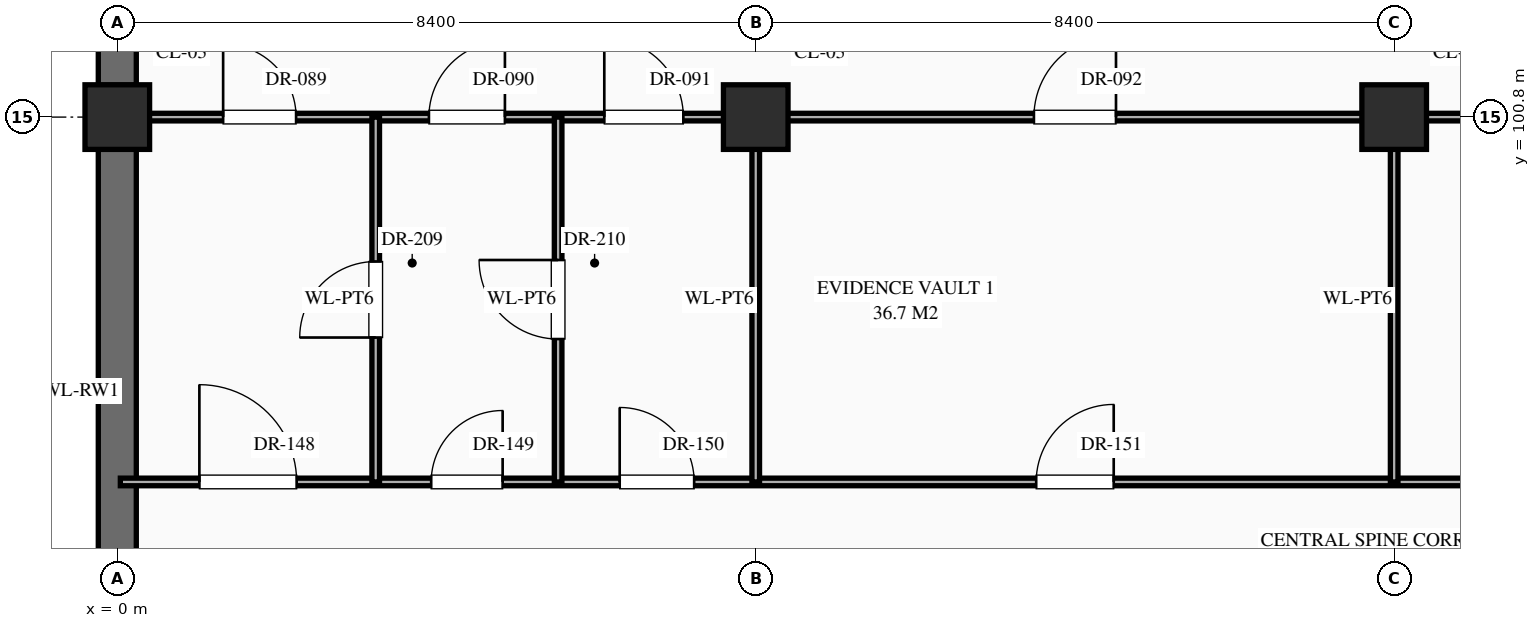
"""IFC4 building model, lengths in metres.
Left out: names, types, materials, properties, quantities, classifications, styles, units other than length and angle.
Written with IfcOpenShell. Run it as: python <this file> out.ifc"""

import sys

from ifc_helpers import new_model, si_unit, direction, frame, frame_2d, origin, origin_2d, place, context, subcontext, project, spatial, rectangle, extrude, element, fill, save


model = new_model("IFC4")
c1 = context("Model", 3, precision=1e-05, world=origin(), true_north=direction((0.0, 1.0)))
c2 = subcontext(c1, "Body", "Model", "MODEL_VIEW")
j1 = project(units=[si_unit("LENGTHUNIT", "METRE"), si_unit("PLANEANGLEUNIT", "RADIAN")], contexts=[c1])
p1 = place(None, origin())
s1 = spatial("IfcSite", under=j1, at=p1, CompositionType="ELEMENT")
p2 = place(p1, origin())
s2 = spatial("IfcBuilding", under=s1, at=p2, CompositionType="ELEMENT")
p3 = place(p2, frame((0.0, 0.0, -10.2)))
s3 = spatial("IfcBuildingStorey", under=s2, at=p3, CompositionType="ELEMENT", Elevation=-10.2)
for number, where, z_axis, x_axis in (
    (1, (0.0, 100.8, 0.0), (0.0, 0.0, 1.0), (1.0, 0.0, 0.0)),
    (2, (8.4, 100.8, 0.0), (0.0, 0.0, 1.0), (1.0, 0.0, 0.0)),
    (3, (16.8, 100.8, 0.0), (0.0, 0.0, 1.0), (1.0, 0.0, 0.0)),
):
    element("IfcColumn", number, at=place(p3, frame(where, z_axis=z_axis, x_axis=x_axis)), inside=s3, PredefinedType="COLUMN", context=c2, shape_type="SweptSolid", body=[
        extrude(rectangle(XDim=0.85, YDim=0.85, at=origin_2d()), origin(), (0.0, 0.0, 1.0), 4.8),
    ])
p4 = place(p3, frame((0.0, 94.02, 0.0), z_axis=(0.0, 0.0, 1.0), x_axis=(0.0, 1.0, 0.0)))
e4 = element("IfcWall", 4, at=p4, inside=s3, PredefinedType="USERDEFINED", context=c2, shape_type="SweptSolid", body=[
    extrude(rectangle(XDim=6.36, YDim=0.5, at=frame_2d((3.18, 0.0))), origin(), (0.0, 0.0, 1.0), 4.48),
])
p5 = place(p3, frame((0.0, 101.22, 0.0), z_axis=(0.0, 0.0, 1.0), x_axis=(0.0, 1.0, 0.0)))
e5 = element("IfcWall", 5, at=p5, inside=s3, PredefinedType="USERDEFINED", context=c2, shape_type="SweptSolid", body=[
    extrude(rectangle(XDim=6.36, YDim=0.5, at=frame_2d((3.18, 0.0))), origin(), (0.0, 0.0, 1.0), 4.48),
])
p6 = place(p3, frame((0.04, 96.0, 0.0), z_axis=(0.0, 0.0, 1.0), x_axis=(1.0, 0.0, 0.0)))
e6 = element("IfcWall", 6, at=p6, inside=s3, PredefinedType="STANDARD", context=c2, shape_type="SweptSolid", body=[
    extrude(rectangle(XDim=151.16, YDim=0.1, at=frame_2d((75.58, 0.0))), origin(), (0.0, 0.0, 1.0), 4.48),
])
p7 = place(p6, frame((1.04, 0.0, 0.0)))
e7 = element("IfcOpeningElement", 7, at=p7, cuts=e6, PredefinedType="OPENING", context=c2, shape_type="SweptSolid", body=[
    extrude(rectangle(XDim=1.28, YDim=2.35, at=frame_2d((0.64, 1.175))), frame((0.0, 0.062, 0.0), z_axis=(0.0, -1.0, 0.0), x_axis=(1.0, 0.0, 0.0)), (0.0, 0.0, 1.0), 0.124),
])
p8 = place(p6, frame((4.09, 0.0, 0.0)))
e8 = element("IfcOpeningElement", 8, at=p8, cuts=e6, PredefinedType="OPENING", context=c2, shape_type="SweptSolid", body=[
    extrude(rectangle(XDim=0.94, YDim=2.3, at=frame_2d((0.47, 1.15))), frame((0.0, 0.062, 0.0), z_axis=(0.0, -1.0, 0.0), x_axis=(1.0, 0.0, 0.0)), (0.0, 0.0, 1.0), 0.124),
])
p9 = place(p6, frame((6.57, 0.0, 0.0)))
e9 = element("IfcOpeningElement", 9, at=p9, cuts=e6, PredefinedType="OPENING", context=c2, shape_type="SweptSolid", body=[
    extrude(rectangle(XDim=0.98, YDim=2.35, at=frame_2d((0.49, 1.175))), frame((0.0, 0.062, 0.0), z_axis=(0.0, -1.0, 0.0), x_axis=(1.0, 0.0, 0.0)), (0.0, 0.0, 1.0), 0.124),
])
p10 = place(p6, frame((12.05, 0.0, 0.0)))
e10 = element("IfcOpeningElement", 10, at=p10, cuts=e6, PredefinedType="OPENING", context=c2, shape_type="SweptSolid", body=[
    extrude(rectangle(XDim=1.02, YDim=2.4, at=frame_2d((0.51, 1.2))), frame((0.0, 0.062, 0.0), z_axis=(0.0, -1.0, 0.0), x_axis=(1.0, 0.0, 0.0)), (0.0, 0.0, 1.0), 0.124),
])
p11 = place(p6, frame((20.43, 0.0, 0.0)))
e11 = element("IfcOpeningElement", 11, at=p11, cuts=e6, PredefinedType="OPENING", context=c2, shape_type="SweptSolid", body=[
    extrude(rectangle(XDim=1.06, YDim=2.4, at=frame_2d((0.53, 1.2))), frame((0.0, 0.062, 0.0), z_axis=(0.0, -1.0, 0.0), x_axis=(1.0, 0.0, 0.0)), (0.0, 0.0, 1.0), 0.124),
])
p12 = place(p6, frame((26.29, 0.0, 0.0)))
e12 = element("IfcOpeningElement", 12, at=p12, cuts=e6, PredefinedType="OPENING", context=c2, shape_type="SweptSolid", body=[
    extrude(rectangle(XDim=1.14, YDim=2.4, at=frame_2d((0.57, 1.2))), frame((0.0, 0.062, 0.0), z_axis=(0.0, -1.0, 0.0), x_axis=(1.0, 0.0, 0.0)), (0.0, 0.0, 1.0), 0.124),
])
p13 = place(p6, frame((29.31, 0.0, 0.0)))
e13 = element("IfcOpeningElement", 13, at=p13, cuts=e6, PredefinedType="OPENING", context=c2, shape_type="SweptSolid", body=[
    extrude(rectangle(XDim=0.9, YDim=2.15, at=frame_2d((0.45, 1.075))), frame((0.0, 0.062, 0.0), z_axis=(0.0, -1.0, 0.0), x_axis=(1.0, 0.0, 0.0)), (0.0, 0.0, 1.0), 0.124),
])
p14 = place(p6, frame((31.83, 0.0, 0.0)))
e14 = element("IfcOpeningElement", 14, at=p14, cuts=e6, PredefinedType="OPENING", context=c2, shape_type="SweptSolid", body=[
    extrude(rectangle(XDim=0.86, YDim=2.1, at=frame_2d((0.43, 1.05))), frame((0.0, 0.062, 0.0), z_axis=(0.0, -1.0, 0.0), x_axis=(1.0, 0.0, 0.0)), (0.0, 0.0, 1.0), 0.124),
])
p15 = place(p6, frame((37.3, 0.0, 0.0)))
e15 = element("IfcOpeningElement", 15, at=p15, cuts=e6, PredefinedType="OPENING", context=c2, shape_type="SweptSolid", body=[
    extrude(rectangle(XDim=0.92, YDim=2.15, at=frame_2d((0.46, 1.075))), frame((0.0, 0.062, 0.0), z_axis=(0.0, -1.0, 0.0), x_axis=(1.0, 0.0, 0.0)), (0.0, 0.0, 1.0), 0.124),
])
p16 = place(p6, frame((45.68, 0.0, 0.0)))
e16 = element("IfcOpeningElement", 16, at=p16, cuts=e6, PredefinedType="OPENING", context=c2, shape_type="SweptSolid", body=[
    extrude(rectangle(XDim=0.96, YDim=2.2, at=frame_2d((0.48, 1.1))), frame((0.0, 0.062, 0.0), z_axis=(0.0, -1.0, 0.0), x_axis=(1.0, 0.0, 0.0)), (0.0, 0.0, 1.0), 0.124),
])
p17 = place(p6, frame((51.57, 0.0, 0.0)))
e17 = element("IfcOpeningElement", 17, at=p17, cuts=e6, PredefinedType="OPENING", context=c2, shape_type="SweptSolid", body=[
    extrude(rectangle(XDim=0.98, YDim=2.35, at=frame_2d((0.49, 1.175))), frame((0.0, 0.062, 0.0), z_axis=(0.0, -1.0, 0.0), x_axis=(1.0, 0.0, 0.0)), (0.0, 0.0, 1.0), 0.124),
])
p18 = place(p6, frame((54.45, 0.0, 0.0)))
e18 = element("IfcOpeningElement", 18, at=p18, cuts=e6, PredefinedType="OPENING", context=c2, shape_type="SweptSolid", body=[
    extrude(rectangle(XDim=1.02, YDim=2.4, at=frame_2d((0.51, 1.2))), frame((0.0, 0.062, 0.0), z_axis=(0.0, -1.0, 0.0), x_axis=(1.0, 0.0, 0.0)), (0.0, 0.0, 1.0), 0.124),
])
p19 = place(p6, frame((56.93, 0.0, 0.0)))
e19 = element("IfcOpeningElement", 19, at=p19, cuts=e6, PredefinedType="OPENING", context=c2, shape_type="SweptSolid", body=[
    extrude(rectangle(XDim=1.06, YDim=2.4, at=frame_2d((0.53, 1.2))), frame((0.0, 0.062, 0.0), z_axis=(0.0, -1.0, 0.0), x_axis=(1.0, 0.0, 0.0)), (0.0, 0.0, 1.0), 0.124),
])
p20 = place(p6, frame((62.39, 0.0, 0.0)))
e20 = element("IfcOpeningElement", 20, at=p20, cuts=e6, PredefinedType="OPENING", context=c2, shape_type="SweptSolid", body=[
    extrude(rectangle(XDim=1.14, YDim=2.4, at=frame_2d((0.57, 1.2))), frame((0.0, 0.062, 0.0), z_axis=(0.0, -1.0, 0.0), x_axis=(1.0, 0.0, 0.0)), (0.0, 0.0, 1.0), 0.124),
])
p21 = place(p6, frame((70.91, 0.0, 0.0)))
e21 = element("IfcOpeningElement", 21, at=p21, cuts=e6, PredefinedType="OPENING", context=c2, shape_type="SweptSolid", body=[
    extrude(rectangle(XDim=0.9, YDim=2.15, at=frame_2d((0.45, 1.075))), frame((0.0, 0.062, 0.0), z_axis=(0.0, -1.0, 0.0), x_axis=(1.0, 0.0, 0.0)), (0.0, 0.0, 1.0), 0.124),
])
p22 = place(p6, frame((79.33, 0.0, 0.0)))
e22 = element("IfcOpeningElement", 22, at=p22, cuts=e6, PredefinedType="OPENING", context=c2, shape_type="SweptSolid", body=[
    extrude(rectangle(XDim=0.86, YDim=2.1, at=frame_2d((0.43, 1.05))), frame((0.0, 0.062, 0.0), z_axis=(0.0, -1.0, 0.0), x_axis=(1.0, 0.0, 0.0)), (0.0, 0.0, 1.0), 0.124),
])
p23 = place(p6, frame((85.1, 0.0, 0.0)))
e23 = element("IfcOpeningElement", 23, at=p23, cuts=e6, PredefinedType="OPENING", context=c2, shape_type="SweptSolid", body=[
    extrude(rectangle(XDim=1.12, YDim=2.25, at=frame_2d((0.56, 1.125))), frame((0.0, 0.062, 0.0), z_axis=(0.0, -1.0, 0.0), x_axis=(1.0, 0.0, 0.0)), (0.0, 0.0, 1.0), 0.124),
])
p24 = place(p6, frame((87.98, 0.0, 0.0)))
e24 = element("IfcOpeningElement", 24, at=p24, cuts=e6, PredefinedType="OPENING", context=c2, shape_type="SweptSolid", body=[
    extrude(rectangle(XDim=1.16, YDim=2.3, at=frame_2d((0.58, 1.15))), frame((0.0, 0.062, 0.0), z_axis=(0.0, -1.0, 0.0), x_axis=(1.0, 0.0, 0.0)), (0.0, 0.0, 1.0), 0.124),
])
p25 = place(p6, frame((90.46, 0.0, 0.0)))
e25 = element("IfcOpeningElement", 25, at=p25, cuts=e6, PredefinedType="OPENING", context=c2, shape_type="SweptSolid", body=[
    extrude(rectangle(XDim=1.2, YDim=2.35, at=frame_2d((0.6, 1.175))), frame((0.0, 0.062, 0.0), z_axis=(0.0, -1.0, 0.0), x_axis=(1.0, 0.0, 0.0)), (0.0, 0.0, 1.0), 0.124),
])
p26 = place(p6, frame((95.94, 0.0, 0.0)))
e26 = element("IfcOpeningElement", 26, at=p26, cuts=e6, PredefinedType="OPENING", context=c2, shape_type="SweptSolid", body=[
    extrude(rectangle(XDim=1.24, YDim=2.3, at=frame_2d((0.62, 1.15))), frame((0.0, 0.062, 0.0), z_axis=(0.0, -1.0, 0.0), x_axis=(1.0, 0.0, 0.0)), (0.0, 0.0, 1.0), 0.124),
])
p27 = place(p6, frame((104.32, 0.0, 0.0)))
e27 = element("IfcOpeningElement", 27, at=p27, cuts=e6, PredefinedType="OPENING", context=c2, shape_type="SweptSolid", body=[
    extrude(rectangle(XDim=1.28, YDim=2.35, at=frame_2d((0.64, 1.175))), frame((0.0, 0.062, 0.0), z_axis=(0.0, -1.0, 0.0), x_axis=(1.0, 0.0, 0.0)), (0.0, 0.0, 1.0), 0.124),
])
p28 = place(p6, frame((110.39, 0.0, 0.0)))
e28 = element("IfcOpeningElement", 28, at=p28, cuts=e6, PredefinedType="OPENING", context=c2, shape_type="SweptSolid", body=[
    extrude(rectangle(XDim=0.94, YDim=2.3, at=frame_2d((0.47, 1.15))), frame((0.0, 0.062, 0.0), z_axis=(0.0, -1.0, 0.0), x_axis=(1.0, 0.0, 0.0)), (0.0, 0.0, 1.0), 0.124),
])
p29 = place(p6, frame((113.27, 0.0, 0.0)))
e29 = element("IfcOpeningElement", 29, at=p29, cuts=e6, PredefinedType="OPENING", context=c2, shape_type="SweptSolid", body=[
    extrude(rectangle(XDim=0.98, YDim=2.35, at=frame_2d((0.49, 1.175))), frame((0.0, 0.062, 0.0), z_axis=(0.0, -1.0, 0.0), x_axis=(1.0, 0.0, 0.0)), (0.0, 0.0, 1.0), 0.124),
])
p30 = place(p6, frame((115.75, 0.0, 0.0)))
e30 = element("IfcOpeningElement", 30, at=p30, cuts=e6, PredefinedType="OPENING", context=c2, shape_type="SweptSolid", body=[
    extrude(rectangle(XDim=1.02, YDim=2.4, at=frame_2d((0.51, 1.2))), frame((0.0, 0.062, 0.0), z_axis=(0.0, -1.0, 0.0), x_axis=(1.0, 0.0, 0.0)), (0.0, 0.0, 1.0), 0.124),
])
p31 = place(p6, frame((121.24, 0.0, 0.0)))
e31 = element("IfcOpeningElement", 31, at=p31, cuts=e6, PredefinedType="OPENING", context=c2, shape_type="SweptSolid", body=[
    extrude(rectangle(XDim=1.04, YDim=2.2, at=frame_2d((0.52, 1.1))), frame((0.0, 0.062, 0.0), z_axis=(0.0, -1.0, 0.0), x_axis=(1.0, 0.0, 0.0)), (0.0, 0.0, 1.0), 0.124),
])
p32 = place(p6, frame((129.62, 0.0, 0.0)))
e32 = element("IfcOpeningElement", 32, at=p32, cuts=e6, PredefinedType="OPENING", context=c2, shape_type="SweptSolid", body=[
    extrude(rectangle(XDim=1.08, YDim=2.25, at=frame_2d((0.54, 1.125))), frame((0.0, 0.062, 0.0), z_axis=(0.0, -1.0, 0.0), x_axis=(1.0, 0.0, 0.0)), (0.0, 0.0, 1.0), 0.124),
])
p33 = place(p6, frame((135.5, 0.0, 0.0)))
e33 = element("IfcOpeningElement", 33, at=p33, cuts=e6, PredefinedType="OPENING", context=c2, shape_type="SweptSolid", body=[
    extrude(rectangle(XDim=1.12, YDim=2.25, at=frame_2d((0.56, 1.125))), frame((0.0, 0.062, 0.0), z_axis=(0.0, -1.0, 0.0), x_axis=(1.0, 0.0, 0.0)), (0.0, 0.0, 1.0), 0.124),
])
p34 = place(p6, frame((138.38, 0.0, 0.0)))
e34 = element("IfcOpeningElement", 34, at=p34, cuts=e6, PredefinedType="OPENING", context=c2, shape_type="SweptSolid", body=[
    extrude(rectangle(XDim=1.16, YDim=2.3, at=frame_2d((0.58, 1.15))), frame((0.0, 0.062, 0.0), z_axis=(0.0, -1.0, 0.0), x_axis=(1.0, 0.0, 0.0)), (0.0, 0.0, 1.0), 0.124),
])
p35 = place(p6, frame((140.86, 0.0, 0.0)))
e35 = element("IfcOpeningElement", 35, at=p35, cuts=e6, PredefinedType="OPENING", context=c2, shape_type="SweptSolid", body=[
    extrude(rectangle(XDim=1.2, YDim=2.35, at=frame_2d((0.6, 1.175))), frame((0.0, 0.062, 0.0), z_axis=(0.0, -1.0, 0.0), x_axis=(1.0, 0.0, 0.0)), (0.0, 0.0, 1.0), 0.124),
])
p36 = place(p6, frame((146.34, 0.0, 0.0)))
e36 = element("IfcOpeningElement", 36, at=p36, cuts=e6, PredefinedType="OPENING", context=c2, shape_type="SweptSolid", body=[
    extrude(rectangle(XDim=1.24, YDim=2.3, at=frame_2d((0.62, 1.15))), frame((0.0, 0.062, 0.0), z_axis=(0.0, -1.0, 0.0), x_axis=(1.0, 0.0, 0.0)), (0.0, 0.0, 1.0), 0.124),
])
p37 = place(p3, frame((0.04, 100.8, 0.0), z_axis=(0.0, 0.0, 1.0), x_axis=(1.0, 0.0, 0.0)))
e37 = element("IfcWall", 37, at=p37, inside=s3, PredefinedType="STANDARD", context=c2, shape_type="SweptSolid", body=[
    extrude(rectangle(XDim=41.96, YDim=0.1, at=frame_2d((20.98, 0.0))), origin(), (0.0, 0.0, 1.0), 3.63),
])
p38 = place(p37, frame((1.353, 0.0, 0.0)))
e38 = element("IfcOpeningElement", 38, at=p38, cuts=e37, PredefinedType="OPENING", context=c2, shape_type="SweptSolid", body=[
    extrude(rectangle(XDim=0.96, YDim=2.2, at=frame_2d((0.48, 1.1))), frame((0.0, 0.062, 0.0), z_axis=(0.0, -1.0, 0.0), x_axis=(1.0, 0.0, 0.0)), (0.0, 0.0, 1.0), 0.124),
])
p39 = place(p37, frame((4.06, 0.0, 0.0)))
e39 = element("IfcOpeningElement", 39, at=p39, cuts=e37, PredefinedType="OPENING", context=c2, shape_type="SweptSolid", body=[
    extrude(rectangle(XDim=1.0, YDim=2.25, at=frame_2d((0.5, 1.125))), frame((0.0, 0.062, 0.0), z_axis=(0.0, -1.0, 0.0), x_axis=(1.0, 0.0, 0.0)), (0.0, 0.0, 1.0), 0.124),
])
p40 = place(p37, frame((6.367, 0.0, 0.0)))
e40 = element("IfcOpeningElement", 40, at=p40, cuts=e37, PredefinedType="OPENING", context=c2, shape_type="SweptSolid", body=[
    extrude(rectangle(XDim=1.04, YDim=2.2, at=frame_2d((0.52, 1.1))), frame((0.0, 0.062, 0.0), z_axis=(0.0, -1.0, 0.0), x_axis=(1.0, 0.0, 0.0)), (0.0, 0.0, 1.0), 0.124),
])
p41 = place(p37, frame((12.02, 0.0, 0.0)))
e41 = element("IfcOpeningElement", 41, at=p41, cuts=e37, PredefinedType="OPENING", context=c2, shape_type="SweptSolid", body=[
    extrude(rectangle(XDim=1.08, YDim=2.25, at=frame_2d((0.54, 1.125))), frame((0.0, 0.062, 0.0), z_axis=(0.0, -1.0, 0.0), x_axis=(1.0, 0.0, 0.0)), (0.0, 0.0, 1.0), 0.124),
])
p42 = place(p37, frame((20.387, 0.0, 0.0)))
e42 = element("IfcOpeningElement", 42, at=p42, cuts=e37, PredefinedType="OPENING", context=c2, shape_type="SweptSolid", body=[
    extrude(rectangle(XDim=1.12, YDim=2.25, at=frame_2d((0.56, 1.125))), frame((0.0, 0.062, 0.0), z_axis=(0.0, -1.0, 0.0), x_axis=(1.0, 0.0, 0.0)), (0.0, 0.0, 1.0), 0.124),
])
p43 = place(p37, frame((26.465, 0.0, 0.0)))
e43 = element("IfcOpeningElement", 43, at=p43, cuts=e37, PredefinedType="OPENING", context=c2, shape_type="SweptSolid", body=[
    extrude(rectangle(XDim=1.16, YDim=2.3, at=frame_2d((0.58, 1.15))), frame((0.0, 0.062, 0.0), z_axis=(0.0, -1.0, 0.0), x_axis=(1.0, 0.0, 0.0)), (0.0, 0.0, 1.0), 0.124),
])
p44 = place(p37, frame((29.16, 0.0, 0.0)))
e44 = element("IfcOpeningElement", 44, at=p44, cuts=e37, PredefinedType="OPENING", context=c2, shape_type="SweptSolid", body=[
    extrude(rectangle(XDim=1.2, YDim=2.35, at=frame_2d((0.6, 1.175))), frame((0.0, 0.062, 0.0), z_axis=(0.0, -1.0, 0.0), x_axis=(1.0, 0.0, 0.0)), (0.0, 0.0, 1.0), 0.124),
])
p45 = place(p37, frame((31.455, 0.0, 0.0)))
e45 = element("IfcOpeningElement", 45, at=p45, cuts=e37, PredefinedType="OPENING", context=c2, shape_type="SweptSolid", body=[
    extrude(rectangle(XDim=1.24, YDim=2.3, at=frame_2d((0.62, 1.15))), frame((0.0, 0.062, 0.0), z_axis=(0.0, -1.0, 0.0), x_axis=(1.0, 0.0, 0.0)), (0.0, 0.0, 1.0), 0.124),
])
p46 = place(p37, frame((37.12, 0.0, 0.0)))
e46 = element("IfcOpeningElement", 46, at=p46, cuts=e37, PredefinedType="OPENING", context=c2, shape_type="SweptSolid", body=[
    extrude(rectangle(XDim=1.28, YDim=2.35, at=frame_2d((0.64, 1.175))), frame((0.0, 0.062, 0.0), z_axis=(0.0, -1.0, 0.0), x_axis=(1.0, 0.0, 0.0)), (0.0, 0.0, 1.0), 0.124),
])
p47 = place(p3, frame((3.4, 96.0, 0.0), z_axis=(0.0, 0.0, 1.0), x_axis=(0.0, 1.0, 0.0)))
e47 = element("IfcWall", 47, at=p47, inside=s3, PredefinedType="STANDARD", context=c2, shape_type="SweptSolid", body=[
    extrude(rectangle(XDim=4.8, YDim=0.1, at=frame_2d((2.4, 0.0))), origin(), (0.0, 0.0, 1.0), 4.48),
])
p48 = place(p47, frame((1.9, 0.0, 0.0)))
e48 = element("IfcOpeningElement", 48, at=p48, cuts=e47, PredefinedType="OPENING", context=c2, shape_type="SweptSolid", body=[
    extrude(rectangle(XDim=1.0, YDim=2.25, at=frame_2d((0.5, 1.125))), frame((0.0, 0.062, 0.0), z_axis=(0.0, -1.0, 0.0), x_axis=(1.0, 0.0, 0.0)), (0.0, 0.0, 1.0), 0.124),
])
p49 = place(p3, frame((5.8, 96.0, 0.0), z_axis=(0.0, 0.0, 1.0), x_axis=(0.0, 1.0, 0.0)))
e49 = element("IfcWall", 49, at=p49, inside=s3, PredefinedType="STANDARD", context=c2, shape_type="SweptSolid", body=[
    extrude(rectangle(XDim=4.8, YDim=0.1, at=frame_2d((2.4, 0.0))), origin(), (0.0, 0.0, 1.0), 4.48),
])
p50 = place(p49, frame((1.88, 0.0, 0.0)))
e50 = element("IfcOpeningElement", 50, at=p50, cuts=e49, PredefinedType="OPENING", context=c2, shape_type="SweptSolid", body=[
    extrude(rectangle(XDim=1.04, YDim=2.2, at=frame_2d((0.52, 1.1))), frame((0.0, 0.062, 0.0), z_axis=(0.0, -1.0, 0.0), x_axis=(1.0, 0.0, 0.0)), (0.0, 0.0, 1.0), 0.124),
])
for number, where, z_axis, x_axis in (
    (51, (8.4, 96.0, 0.0), (0.0, 0.0, 1.0), (0.0, 1.0, 0.0)),
    (52, (16.8, 96.0, 0.0), (0.0, 0.0, 1.0), (0.0, 1.0, 0.0)),
):
    element("IfcWall", number, at=place(p3, frame(where, z_axis=z_axis, x_axis=x_axis)), inside=s3, PredefinedType="STANDARD", context=c2, shape_type="SweptSolid", body=[
        extrude(rectangle(XDim=4.8, YDim=0.1, at=frame_2d((2.4, 0.0))), origin(), (0.0, 0.0, 1.0), 3.73),
    ])
p51 = place(p38, origin())
e53 = element("IfcDoor", 53, at=p51, inside=s3, OperationType="SINGLE_SWING_LEFT", PredefinedType="DOOR", context=c2, shape_type="SweptSolid", body=[
    extrude(rectangle(XDim=0.96, YDim=2.2, at=frame_2d((0.48, 1.1))), frame((0.0, 0.025, 0.0), z_axis=(0.0, -1.0, 0.0), x_axis=(1.0, 0.0, 0.0)), (0.0, 0.0, 1.0), 0.05),
])
fill(e38, e53)
p52 = place(p39, origin())
e54 = element("IfcDoor", 54, at=p52, inside=s3, OperationType="SINGLE_SWING_RIGHT", PredefinedType="DOOR", context=c2, shape_type="SweptSolid", body=[
    extrude(rectangle(XDim=1.0, YDim=2.25, at=frame_2d((0.5, 1.125))), frame((0.0, 0.025, 0.0), z_axis=(0.0, -1.0, 0.0), x_axis=(1.0, 0.0, 0.0)), (0.0, 0.0, 1.0), 0.05),
])
fill(e39, e54)
p53 = place(p40, origin())
e55 = element("IfcDoor", 55, at=p53, inside=s3, OperationType="SINGLE_SWING_LEFT", PredefinedType="DOOR", context=c2, shape_type="SweptSolid", body=[
    extrude(rectangle(XDim=1.04, YDim=2.2, at=frame_2d((0.52, 1.1))), frame((0.0, 0.025, 0.0), z_axis=(0.0, -1.0, 0.0), x_axis=(1.0, 0.0, 0.0)), (0.0, 0.0, 1.0), 0.05),
])
fill(e40, e55)
p54 = place(p41, origin())
e56 = element("IfcDoor", 56, at=p54, inside=s3, OperationType="SINGLE_SWING_RIGHT", PredefinedType="DOOR", context=c2, shape_type="SweptSolid", body=[
    extrude(rectangle(XDim=1.08, YDim=2.25, at=frame_2d((0.54, 1.125))), frame((0.0, 0.025, 0.0), z_axis=(0.0, -1.0, 0.0), x_axis=(1.0, 0.0, 0.0)), (0.0, 0.0, 1.0), 0.05),
])
fill(e41, e56)
p55 = place(p7, origin())
e57 = element("IfcDoor", 57, at=p55, inside=s3, OperationType="SINGLE_SWING_LEFT", PredefinedType="DOOR", context=c2, shape_type="SweptSolid", body=[
    extrude(rectangle(XDim=1.28, YDim=2.35, at=frame_2d((0.64, 1.175))), frame((0.0, 0.025, 0.0), z_axis=(0.0, -1.0, 0.0), x_axis=(1.0, 0.0, 0.0)), (0.0, 0.0, 1.0), 0.05),
])
fill(e7, e57)
p56 = place(p8, origin())
e58 = element("IfcDoor", 58, at=p56, inside=s3, OperationType="SINGLE_SWING_RIGHT", PredefinedType="DOOR", context=c2, shape_type="SweptSolid", body=[
    extrude(rectangle(XDim=0.94, YDim=2.3, at=frame_2d((0.47, 1.15))), frame((0.0, 0.025, 0.0), z_axis=(0.0, -1.0, 0.0), x_axis=(1.0, 0.0, 0.0)), (0.0, 0.0, 1.0), 0.05),
])
fill(e8, e58)
p57 = place(p9, origin())
e59 = element("IfcDoor", 59, at=p57, inside=s3, OperationType="SINGLE_SWING_LEFT", PredefinedType="DOOR", context=c2, shape_type="SweptSolid", body=[
    extrude(rectangle(XDim=0.98, YDim=2.35, at=frame_2d((0.49, 1.175))), frame((0.0, 0.025, 0.0), z_axis=(0.0, -1.0, 0.0), x_axis=(1.0, 0.0, 0.0)), (0.0, 0.0, 1.0), 0.05),
])
fill(e9, e59)
p58 = place(p10, origin())
e60 = element("IfcDoor", 60, at=p58, inside=s3, OperationType="SINGLE_SWING_RIGHT", PredefinedType="DOOR", context=c2, shape_type="SweptSolid", body=[
    extrude(rectangle(XDim=1.02, YDim=2.4, at=frame_2d((0.51, 1.2))), frame((0.0, 0.025, 0.0), z_axis=(0.0, -1.0, 0.0), x_axis=(1.0, 0.0, 0.0)), (0.0, 0.0, 1.0), 0.05),
])
fill(e10, e60)
p59 = place(p48, origin())
e61 = element("IfcDoor", 61, at=p59, inside=s3, OperationType="SINGLE_SWING_LEFT", PredefinedType="DOOR", context=c2, shape_type="SweptSolid", body=[
    extrude(rectangle(XDim=1.0, YDim=2.25, at=frame_2d((0.5, 1.125))), frame((0.0, 0.025, 0.0), z_axis=(0.0, -1.0, 0.0), x_axis=(1.0, 0.0, 0.0)), (0.0, 0.0, 1.0), 0.05),
])
fill(e48, e61)
p60 = place(p50, origin())
e62 = element("IfcDoor", 62, at=p60, inside=s3, OperationType="SINGLE_SWING_RIGHT", PredefinedType="DOOR", context=c2, shape_type="SweptSolid", body=[
    extrude(rectangle(XDim=1.04, YDim=2.2, at=frame_2d((0.52, 1.1))), frame((0.0, 0.025, 0.0), z_axis=(0.0, -1.0, 0.0), x_axis=(1.0, 0.0, 0.0)), (0.0, 0.0, 1.0), 0.05),
])
fill(e50, e62)
save(model, sys.argv[1])
